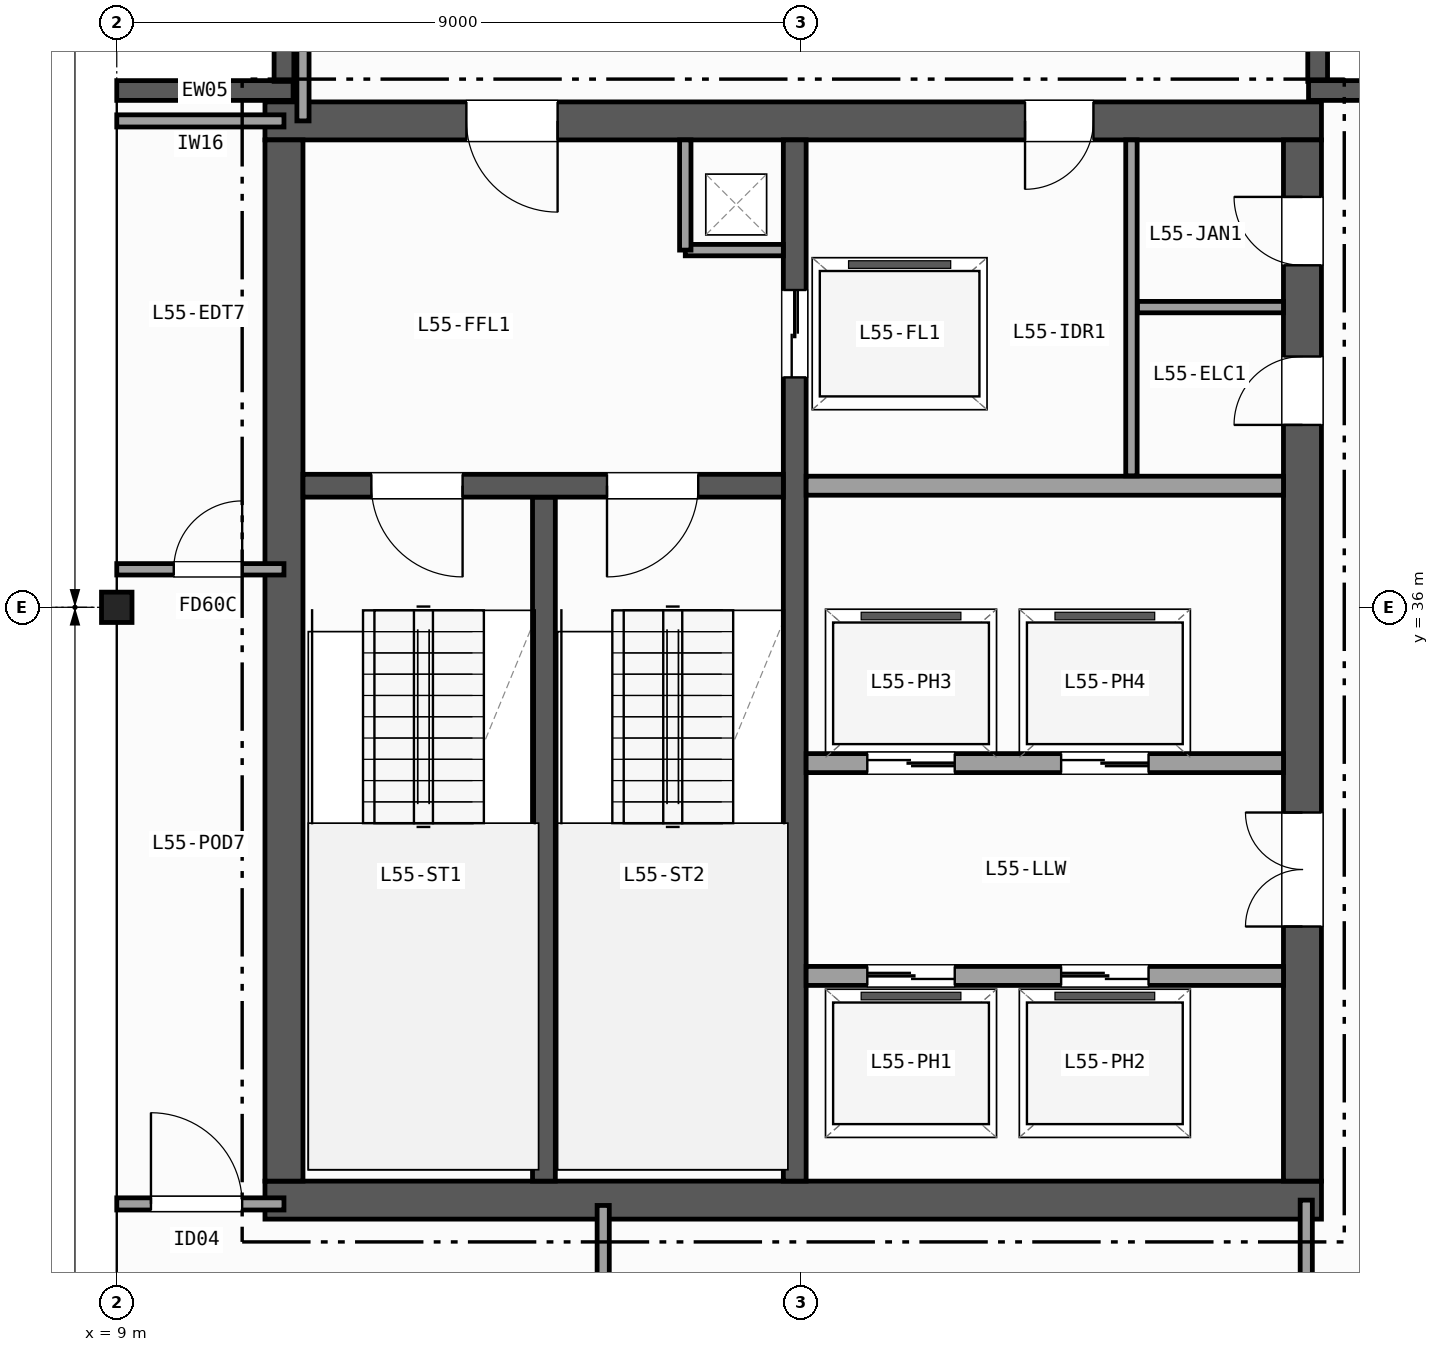
"""IFC4 building model, lengths in metres.
Left out: names, types, materials, properties, quantities, classifications, styles, units other than length and angle.
Written with IfcOpenShell. Run it as: python <this file> out.ifc"""

import sys

from ifc_helpers import new_model, si_unit, direction, frame, frame_2d, origin, origin_2d, place, context, subcontext, project, spatial, rectangle, i_section, extrude, element, fill, save


model = new_model("IFC4")
c1 = context("Model", 3, precision=1e-05, world=origin(), true_north=direction((0.0, 1.0)))
c2 = subcontext(c1, "Body", "Model", "MODEL_VIEW")
j1 = project(units=[si_unit("LENGTHUNIT", "METRE"), si_unit("PLANEANGLEUNIT", "RADIAN")], contexts=[c1])
p1 = place(None, origin())
s1 = spatial("IfcSite", under=j1, at=p1, CompositionType="ELEMENT")
p2 = place(p1, origin())
s2 = spatial("IfcBuilding", under=s1, at=p2, CompositionType="ELEMENT")
p3 = place(p2, frame((0.0, 0.0, 221.0)))
s3 = spatial("IfcBuildingStorey", under=s2, at=p3, CompositionType="ELEMENT", Elevation=221.0)
p4 = place(p3, frame((9.0, 36.0, 0.0), z_axis=(0.0, 0.0, 1.0), x_axis=(1.0, 0.0, 0.0)))
e1 = element("IfcColumn", 1, at=p4, inside=s3, PredefinedType="COLUMN", context=c2, shape_type="SweptSolid", body=[
    extrude(i_section(OverallWidth=0.401, OverallDepth=0.399, WebThickness=0.025, FlangeThickness=0.04, FilletRadius=0.015, at=origin_2d()), origin(), (0.0, 0.0, 1.0), 3.7),
])
p5 = place(p3, frame((9.0, 42.8, 0.0), z_axis=(0.0, 0.0, 1.0), x_axis=(1.0, 0.0, 0.0)))
e2 = element("IfcWall", 2, at=p5, inside=s3, PredefinedType="SOLIDWALL", context=c2, shape_type="SweptSolid", body=[
    extrude(rectangle(XDim=2.32, YDim=0.26, at=frame_2d((1.16, 0.0))), origin(), (0.0, 0.0, 1.0), 3.42),
])
for number, where, z_axis, x_axis in (
    (3, (11.2, 42.92, 0.0), (0.0, 0.0, 1.0), (0.0, 1.0, 0.0)),
    (4, (24.8, 45.0, 0.0), (0.0, 0.0, 1.0), (0.0, -1.0, 0.0)),
):
    element("IfcWall", number, at=place(p3, frame(where, z_axis=z_axis, x_axis=x_axis)), inside=s3, PredefinedType="SOLIDWALL", context=c2, shape_type="SweptSolid", body=[
        extrude(rectangle(XDim=2.08, YDim=0.26, at=frame_2d((1.04, 0.0))), origin(), (0.0, 0.0, 1.0), 3.42),
    ])
p6 = place(p3, frame((24.68, 42.8, 0.0), z_axis=(0.0, 0.0, 1.0), x_axis=(1.0, 0.0, 0.0)))
e5 = element("IfcWall", 5, at=p6, inside=s3, PredefinedType="SOLIDWALL", context=c2, shape_type="SweptSolid", body=[
    extrude(rectangle(XDim=2.32, YDim=0.26, at=frame_2d((1.16, 0.0))), origin(), (0.0, 0.0, 1.0), 3.42),
])
p7 = place(p3, frame((10.95, 28.2, 0.0), z_axis=(0.0, 0.0, 1.0), x_axis=(1.0, 0.0, 0.0)))
e6 = element("IfcWall", 6, at=p7, inside=s3, PredefinedType="SHEAR", context=c2, shape_type="SweptSolid", body=[
    extrude(rectangle(XDim=13.9, YDim=0.5, at=frame_2d((6.95, 0.0))), origin(), (0.0, 0.0, 1.0), 3.42),
])
p8 = place(p3, frame((24.85, 42.4, 0.0), z_axis=(0.0, 0.0, 1.0), x_axis=(-1.0, 0.0, 0.0)))
e7 = element("IfcWall", 7, at=p8, inside=s3, PredefinedType="SHEAR", context=c2, shape_type="SweptSolid", body=[
    extrude(rectangle(XDim=13.9, YDim=0.5, at=frame_2d((6.95, 0.0))), origin(), (0.0, 0.0, 1.0), 3.42),
])
p9 = place(p8, frame((10.05, 0.0, 0.0)))
e8 = element("IfcOpeningElement", 8, at=p9, cuts=e7, PredefinedType="OPENING", context=c2, shape_type="SweptSolid", body=[
    extrude(rectangle(XDim=1.2, YDim=2.15, at=frame_2d((0.6, 1.075))), frame((0.0, 0.26, 0.0), z_axis=(0.0, -1.0, 0.0), x_axis=(1.0, 0.0, 0.0)), (0.0, 0.0, 1.0), 0.52),
])
p10 = place(p8, frame((3.0, 0.0, 0.0)))
e9 = element("IfcOpeningElement", 9, at=p10, cuts=e7, PredefinedType="OPENING", context=c2, shape_type="SweptSolid", body=[
    extrude(rectangle(XDim=0.9, YDim=2.1, at=frame_2d((0.45, 1.05))), frame((0.0, 0.26, 0.0), z_axis=(0.0, -1.0, 0.0), x_axis=(1.0, 0.0, 0.0)), (0.0, 0.0, 1.0), 0.52),
])
p11 = place(p3, frame((11.2, 42.15, 0.0), z_axis=(0.0, 0.0, 1.0), x_axis=(0.0, -1.0, 0.0)))
e10 = element("IfcWall", 10, at=p11, inside=s3, PredefinedType="SHEAR", context=c2, shape_type="SweptSolid", body=[
    extrude(rectangle(XDim=13.7, YDim=0.5, at=frame_2d((6.85, 0.0))), origin(), (0.0, 0.0, 1.0), 3.42),
])
p12 = place(p3, frame((24.6, 28.45, 0.0), z_axis=(0.0, 0.0, 1.0), x_axis=(0.0, 1.0, 0.0)))
e11 = element("IfcWall", 11, at=p12, inside=s3, PredefinedType="SHEAR", context=c2, shape_type="SweptSolid", body=[
    extrude(rectangle(XDim=13.7, YDim=0.5, at=frame_2d((6.85, 0.0))), origin(), (0.0, 0.0, 1.0), 3.42),
])
p13 = place(p12, frame((3.35, 0.0, 0.0)))
e12 = element("IfcOpeningElement", 12, at=p13, cuts=e11, PredefinedType="OPENING", context=c2, shape_type="SweptSolid", body=[
    extrude(rectangle(XDim=1.5, YDim=2.2, at=frame_2d((0.75, 1.1))), frame((0.0, 0.26, 0.0), z_axis=(0.0, -1.0, 0.0), x_axis=(1.0, 0.0, 0.0)), (0.0, 0.0, 1.0), 0.52),
])
p14 = place(p12, frame((9.95, 0.0, 0.0)))
e13 = element("IfcOpeningElement", 13, at=p14, cuts=e11, PredefinedType="OPENING", context=c2, shape_type="SweptSolid", body=[
    extrude(rectangle(XDim=0.9, YDim=2.1, at=frame_2d((0.45, 1.05))), frame((0.0, 0.26, 0.0), z_axis=(0.0, -1.0, 0.0), x_axis=(1.0, 0.0, 0.0)), (0.0, 0.0, 1.0), 0.52),
])
p15 = place(p12, frame((12.05, 0.0, 0.0)))
e14 = element("IfcOpeningElement", 14, at=p15, cuts=e11, PredefinedType="OPENING", context=c2, shape_type="SweptSolid", body=[
    extrude(rectangle(XDim=0.9, YDim=2.1, at=frame_2d((0.45, 1.05))), frame((0.0, 0.26, 0.0), z_axis=(0.0, -1.0, 0.0), x_axis=(1.0, 0.0, 0.0)), (0.0, 0.0, 1.0), 0.52),
])
p16 = place(p3, frame((14.62, 28.45, 0.0), z_axis=(0.0, 0.0, 1.0), x_axis=(0.0, 1.0, 0.0)))
e15 = element("IfcWall", 15, at=p16, inside=s3, PredefinedType="SHEAR", context=c2, shape_type="SweptSolid", body=[
    extrude(rectangle(XDim=9.0, YDim=0.3, at=frame_2d((4.5, 0.0))), origin(), (0.0, 0.0, 1.0), 3.42),
])
p17 = place(p3, frame((17.92, 42.15, 0.0), z_axis=(0.0, 0.0, 1.0), x_axis=(0.0, -1.0, 0.0)))
e16 = element("IfcWall", 16, at=p17, inside=s3, PredefinedType="SHEAR", context=c2, shape_type="SweptSolid", body=[
    extrude(rectangle(XDim=13.7, YDim=0.3, at=frame_2d((6.85, 0.0))), origin(), (0.0, 0.0, 1.0), 3.42),
])
p18 = place(p17, frame((1.975, 0.0, 0.0)))
e17 = element("IfcOpeningElement", 17, at=p18, cuts=e16, PredefinedType="OPENING", context=c2, shape_type="SweptSolid", body=[
    extrude(rectangle(XDim=1.15, YDim=2.15, at=frame_2d((0.575, 1.075))), frame((0.0, 0.16, 0.0), z_axis=(0.0, -1.0, 0.0), x_axis=(1.0, 0.0, 0.0)), (0.0, 0.0, 1.0), 0.32),
])
p19 = place(p3, frame((17.77, 37.6, 0.0), z_axis=(0.0, 0.0, 1.0), x_axis=(-1.0, 0.0, 0.0)))
e18 = element("IfcWall", 18, at=p19, inside=s3, PredefinedType="SHEAR", context=c2, shape_type="SweptSolid", body=[
    extrude(rectangle(XDim=6.32, YDim=0.3, at=frame_2d((3.16, 0.0))), origin(), (0.0, 0.0, 1.0), 3.42),
])
p20 = place(p19, frame((4.22, 0.0, 0.0)))
e19 = element("IfcOpeningElement", 19, at=p20, cuts=e18, PredefinedType="OPENING", context=c2, shape_type="SweptSolid", body=[
    extrude(rectangle(XDim=1.2, YDim=2.15, at=frame_2d((0.6, 1.075))), frame((0.0, 0.16, 0.0), z_axis=(0.0, -1.0, 0.0), x_axis=(1.0, 0.0, 0.0)), (0.0, 0.0, 1.0), 0.32),
])
p21 = place(p19, frame((1.12, 0.0, 0.0)))
e20 = element("IfcOpeningElement", 20, at=p21, cuts=e18, PredefinedType="OPENING", context=c2, shape_type="SweptSolid", body=[
    extrude(rectangle(XDim=1.2, YDim=2.15, at=frame_2d((0.6, 1.075))), frame((0.0, 0.16, 0.0), z_axis=(0.0, -1.0, 0.0), x_axis=(1.0, 0.0, 0.0)), (0.0, 0.0, 1.0), 0.32),
])
p22 = place(p3, frame((16.48, 40.7, 0.0), z_axis=(0.0, 0.0, 1.0), x_axis=(1.0, 0.0, 0.0)))
e21 = element("IfcWall", 21, at=p22, inside=s3, PredefinedType="PARTITIONING", context=c2, shape_type="SweptSolid", body=[
    extrude(rectangle(XDim=1.29, YDim=0.15, at=frame_2d((0.645, 0.0))), origin(), (0.0, 0.0, 1.0), 3.42),
])
p23 = place(p3, frame((16.48, 40.7, 0.0), z_axis=(0.0, 0.0, 1.0), x_axis=(0.0, 1.0, 0.0)))
e22 = element("IfcWall", 22, at=p23, inside=s3, PredefinedType="PARTITIONING", context=c2, shape_type="SweptSolid", body=[
    extrude(rectangle(XDim=1.45, YDim=0.15, at=frame_2d((0.725, 0.0))), origin(), (0.0, 0.0, 1.0), 3.42),
])
p24 = place(p3, frame((18.07, 37.6, 0.0), z_axis=(0.0, 0.0, 1.0), x_axis=(1.0, 0.0, 0.0)))
e23 = element("IfcWall", 23, at=p24, inside=s3, PredefinedType="PARTITIONING", context=c2, shape_type="SweptSolid", body=[
    extrude(rectangle(XDim=6.28, YDim=0.25, at=frame_2d((3.14, 0.0))), origin(), (0.0, 0.0, 1.0), 3.42),
])
p25 = place(p3, frame((18.07, 31.15, 0.0), z_axis=(0.0, 0.0, 1.0), x_axis=(1.0, 0.0, 0.0)))
e24 = element("IfcWall", 24, at=p25, inside=s3, PredefinedType="PARTITIONING", context=c2, shape_type="SweptSolid", body=[
    extrude(rectangle(XDim=6.28, YDim=0.25, at=frame_2d((3.14, 0.0))), origin(), (0.0, 0.0, 1.0), 3.42),
])
p26 = place(p25, frame((0.805, 0.0, 0.0)))
e25 = element("IfcOpeningElement", 25, at=p26, cuts=e24, PredefinedType="OPENING", context=c2, shape_type="SweptSolid", body=[
    extrude(rectangle(XDim=1.15, YDim=2.15, at=frame_2d((0.575, 1.075))), frame((0.0, 0.135, 0.0), z_axis=(0.0, -1.0, 0.0), x_axis=(1.0, 0.0, 0.0)), (0.0, 0.0, 1.0), 0.27),
])
p27 = place(p25, frame((3.355, 0.0, 0.0)))
e26 = element("IfcOpeningElement", 26, at=p27, cuts=e24, PredefinedType="OPENING", context=c2, shape_type="SweptSolid", body=[
    extrude(rectangle(XDim=1.15, YDim=2.15, at=frame_2d((0.575, 1.075))), frame((0.0, 0.135, 0.0), z_axis=(0.0, -1.0, 0.0), x_axis=(1.0, 0.0, 0.0)), (0.0, 0.0, 1.0), 0.27),
])
p28 = place(p3, frame((24.35, 33.95, 0.0), z_axis=(0.0, 0.0, 1.0), x_axis=(-1.0, 0.0, 0.0)))
e27 = element("IfcWall", 27, at=p28, inside=s3, PredefinedType="PARTITIONING", context=c2, shape_type="SweptSolid", body=[
    extrude(rectangle(XDim=6.28, YDim=0.25, at=frame_2d((3.14, 0.0))), origin(), (0.0, 0.0, 1.0), 3.42),
])
p29 = place(p28, frame((4.325, 0.0, 0.0)))
e28 = element("IfcOpeningElement", 28, at=p29, cuts=e27, PredefinedType="OPENING", context=c2, shape_type="SweptSolid", body=[
    extrude(rectangle(XDim=1.15, YDim=2.15, at=frame_2d((0.575, 1.075))), frame((0.0, 0.135, 0.0), z_axis=(0.0, -1.0, 0.0), x_axis=(1.0, 0.0, 0.0)), (0.0, 0.0, 1.0), 0.27),
])
p30 = place(p28, frame((1.775, 0.0, 0.0)))
e29 = element("IfcOpeningElement", 29, at=p30, cuts=e27, PredefinedType="OPENING", context=c2, shape_type="SweptSolid", body=[
    extrude(rectangle(XDim=1.15, YDim=2.15, at=frame_2d((0.575, 1.075))), frame((0.0, 0.135, 0.0), z_axis=(0.0, -1.0, 0.0), x_axis=(1.0, 0.0, 0.0)), (0.0, 0.0, 1.0), 0.27),
])
p31 = place(p3, frame((22.35, 37.73, 0.0), z_axis=(0.0, 0.0, 1.0), x_axis=(0.0, 1.0, 0.0)))
e30 = element("IfcWall", 30, at=p31, inside=s3, PredefinedType="PARTITIONING", context=c2, shape_type="SweptSolid", body=[
    extrude(rectangle(XDim=4.42, YDim=0.15, at=frame_2d((2.21, 0.0))), origin(), (0.0, 0.0, 1.0), 3.42),
])
p32 = place(p3, frame((22.43, 39.95, 0.0), z_axis=(0.0, 0.0, 1.0), x_axis=(1.0, 0.0, 0.0)))
e31 = element("IfcWall", 31, at=p32, inside=s3, PredefinedType="PARTITIONING", context=c2, shape_type="SweptSolid", body=[
    extrude(rectangle(XDim=1.92, YDim=0.15, at=frame_2d((0.96, 0.0))), origin(), (0.0, 0.0, 1.0), 3.42),
])
p33 = place(p3, frame((9.0, 28.15, 0.0), z_axis=(0.0, 0.0, 1.0), x_axis=(1.0, 0.0, 0.0)))
e32 = element("IfcWall", 32, at=p33, inside=s3, PredefinedType="PARTITIONING", context=c2, shape_type="SweptSolid", body=[
    extrude(rectangle(XDim=2.2, YDim=0.16, at=frame_2d((1.1, 0.0))), origin(), (0.0, 0.0, 1.0), 2.707),
])
p34 = place(p33, frame((0.45, 0.0, 0.0)))
e33 = element("IfcOpeningElement", 33, at=p34, cuts=e32, PredefinedType="OPENING", context=c2, shape_type="SweptSolid", body=[
    extrude(rectangle(XDim=1.2, YDim=2.15, at=frame_2d((0.6, 1.075))), frame((0.0, 0.09, 0.0), z_axis=(0.0, -1.0, 0.0), x_axis=(1.0, 0.0, 0.0)), (0.0, 0.0, 1.0), 0.18),
])
p35 = place(p3, frame((9.0, 42.4, 0.0), z_axis=(0.0, 0.0, 1.0), x_axis=(1.0, 0.0, 0.0)))
e34 = element("IfcWall", 34, at=p35, inside=s3, PredefinedType="PARTITIONING", context=c2, shape_type="SweptSolid", body=[
    extrude(rectangle(XDim=2.2, YDim=0.16, at=frame_2d((1.1, 0.0))), origin(), (0.0, 0.0, 1.0), 3.42),
])
p36 = place(p3, frame((11.45, 42.4, 0.0), z_axis=(0.0, 0.0, 1.0), x_axis=(0.0, 1.0, 0.0)))
e35 = element("IfcWall", 35, at=p36, inside=s3, PredefinedType="PARTITIONING", context=c2, shape_type="SweptSolid", body=[
    extrude(rectangle(XDim=2.666, YDim=0.16, at=frame_2d((1.333, 0.0))), origin(), (0.0, 0.0, 1.0), 3.42),
])
p37 = place(p3, frame((9.0, 36.5, 0.0), z_axis=(0.0, 0.0, 1.0), x_axis=(1.0, 0.0, 0.0)))
e36 = element("IfcWall", 36, at=p37, inside=s3, PredefinedType="PARTITIONING", context=c2, shape_type="SweptSolid", body=[
    extrude(rectangle(XDim=2.2, YDim=0.15, at=frame_2d((1.1, 0.0))), origin(), (0.0, 0.0, 1.0), 3.42),
])
p38 = place(p37, frame((0.75, 0.0, 0.0)))
e37 = element("IfcOpeningElement", 37, at=p38, cuts=e36, PredefinedType="OPENING", context=c2, shape_type="SweptSolid", body=[
    extrude(rectangle(XDim=0.9, YDim=2.1, at=frame_2d((0.45, 1.05))), frame((0.0, 0.085, 0.0), z_axis=(0.0, -1.0, 0.0), x_axis=(1.0, 0.0, 0.0)), (0.0, 0.0, 1.0), 0.17),
])
p39 = place(p3, frame((24.65, 9.0, 0.0), z_axis=(0.0, 0.0, 1.0), x_axis=(0.0, 1.0, 0.0)))
e38 = element("IfcWall", 38, at=p39, inside=s3, PredefinedType="PARTITIONING", context=c2, shape_type="SweptSolid", body=[
    extrude(rectangle(XDim=19.2, YDim=0.16, at=frame_2d((9.6, 0.0))), origin(), (0.0, 0.0, 1.0), 2.707),
])
p40 = place(p39, frame((12.2, 0.0, 0.0)))
e39 = element("IfcOpeningElement", 39, at=p40, cuts=e38, PredefinedType="OPENING", context=c2, shape_type="SweptSolid", body=[
    extrude(rectangle(XDim=0.95, YDim=2.1, at=frame_2d((0.475, 1.05))), frame((0.0, 0.09, 0.0), z_axis=(0.0, -1.0, 0.0), x_axis=(1.0, 0.0, 0.0)), (0.0, 0.0, 1.0), 0.18),
])
p41 = place(p39, frame((4.2, 0.0, 0.0)))
e40 = element("IfcOpeningElement", 40, at=p41, cuts=e38, PredefinedType="OPENING", context=c2, shape_type="SweptSolid", body=[
    extrude(rectangle(XDim=1.0, YDim=2.1, at=frame_2d((0.5, 1.05))), frame((0.0, 0.09, 0.0), z_axis=(0.0, -1.0, 0.0), x_axis=(1.0, 0.0, 0.0)), (0.0, 0.0, 1.0), 0.18),
])
p42 = place(p3, frame((15.4, 18.0, 0.0), z_axis=(0.0, 0.0, 1.0), x_axis=(0.0, 1.0, 0.0)))
e41 = element("IfcWall", 41, at=p42, inside=s3, PredefinedType="PARTITIONING", context=c2, shape_type="SweptSolid", body=[
    extrude(rectangle(XDim=10.13, YDim=0.16, at=frame_2d((5.065, 0.0))), origin(), (0.0, 0.0, 1.0), 2.789),
])
p43 = place(p42, frame((2.5, 0.0, 0.0)))
e42 = element("IfcOpeningElement", 42, at=p43, cuts=e41, PredefinedType="OPENING", context=c2, shape_type="SweptSolid", body=[
    extrude(rectangle(XDim=1.05, YDim=2.15, at=frame_2d((0.525, 1.075))), frame((0.0, 0.09, 0.0), z_axis=(0.0, -1.0, 0.0), x_axis=(1.0, 0.0, 0.0)), (0.0, 0.0, 1.0), 0.18),
])
p44 = place(p20, origin())
e43 = element("IfcDoor", 43, at=p44, inside=s3, OperationType="SINGLE_SWING_LEFT", PredefinedType="DOOR", context=c2, shape_type="SweptSolid", body=[
    extrude(rectangle(XDim=1.2, YDim=2.15, at=frame_2d((0.6, 1.075))), frame((0.0, 0.025, 0.0), z_axis=(0.0, -1.0, 0.0), x_axis=(1.0, 0.0, 0.0)), (0.0, 0.0, 1.0), 0.05),
])
fill(e19, e43)
p45 = place(p21, origin())
e44 = element("IfcDoor", 44, at=p45, inside=s3, OperationType="SINGLE_SWING_RIGHT", PredefinedType="DOOR", context=c2, shape_type="SweptSolid", body=[
    extrude(rectangle(XDim=1.2, YDim=2.15, at=frame_2d((0.6, 1.075))), frame((0.0, 0.025, 0.0), z_axis=(0.0, -1.0, 0.0), x_axis=(1.0, 0.0, 0.0)), (0.0, 0.0, 1.0), 0.05),
])
fill(e20, e44)
p46 = place(p13, origin())
e45 = element("IfcDoor", 45, at=p46, inside=s3, OperationType="DOUBLE_DOOR_SINGLE_SWING", PredefinedType="DOOR", context=c2, shape_type="SweptSolid", body=[
    extrude(rectangle(XDim=1.5, YDim=2.2, at=frame_2d((0.75, 1.1))), frame((0.0, 0.025, 0.0), z_axis=(0.0, -1.0, 0.0), x_axis=(1.0, 0.0, 0.0)), (0.0, 0.0, 1.0), 0.05),
])
fill(e12, e45)
p47 = place(p9, origin())
e46 = element("IfcDoor", 46, at=p47, inside=s3, OperationType="SINGLE_SWING_LEFT", PredefinedType="DOOR", context=c2, shape_type="SweptSolid", body=[
    extrude(rectangle(XDim=1.2, YDim=2.15, at=frame_2d((0.6, 1.075))), frame((0.0, 0.025, 0.0), z_axis=(0.0, -1.0, 0.0), x_axis=(1.0, 0.0, 0.0)), (0.0, 0.0, 1.0), 0.05),
])
fill(e8, e46)
p48 = place(p14, origin())
e47 = element("IfcDoor", 47, at=p48, inside=s3, OperationType="SINGLE_SWING_LEFT", PredefinedType="DOOR", context=c2, shape_type="SweptSolid", body=[
    extrude(rectangle(XDim=0.9, YDim=2.1, at=frame_2d((0.45, 1.05))), frame((0.0, 0.025, 0.0), z_axis=(0.0, -1.0, 0.0), x_axis=(1.0, 0.0, 0.0)), (0.0, 0.0, 1.0), 0.05),
])
fill(e13, e47)
p49 = place(p10, origin())
e48 = element("IfcDoor", 48, at=p49, inside=s3, OperationType="SINGLE_SWING_RIGHT", PredefinedType="DOOR", context=c2, shape_type="SweptSolid", body=[
    extrude(rectangle(XDim=0.9, YDim=2.1, at=frame_2d((0.45, 1.05))), frame((0.0, 0.025, 0.0), z_axis=(0.0, -1.0, 0.0), x_axis=(1.0, 0.0, 0.0)), (0.0, 0.0, 1.0), 0.05),
])
fill(e9, e48)
p50 = place(p15, origin())
e49 = element("IfcDoor", 49, at=p50, inside=s3, OperationType="SINGLE_SWING_RIGHT", PredefinedType="DOOR", context=c2, shape_type="SweptSolid", body=[
    extrude(rectangle(XDim=0.9, YDim=2.1, at=frame_2d((0.45, 1.05))), frame((0.0, 0.025, 0.0), z_axis=(0.0, -1.0, 0.0), x_axis=(1.0, 0.0, 0.0)), (0.0, 0.0, 1.0), 0.05),
])
fill(e14, e49)
p51 = place(p18, origin())
e50 = element("IfcDoor", 50, at=p51, inside=s3, OperationType="DOUBLE_DOOR_SLIDING", PredefinedType="DOOR", context=c2, shape_type="SweptSolid", body=[
    extrude(rectangle(XDim=1.15, YDim=2.15, at=frame_2d((0.575, 1.075))), frame((0.0, 0.025, 0.0), z_axis=(0.0, -1.0, 0.0), x_axis=(1.0, 0.0, 0.0)), (0.0, 0.0, 1.0), 0.05),
])
fill(e17, e50)
p52 = place(p26, origin())
e51 = element("IfcDoor", 51, at=p52, inside=s3, OperationType="DOUBLE_DOOR_SLIDING", PredefinedType="DOOR", context=c2, shape_type="SweptSolid", body=[
    extrude(rectangle(XDim=1.15, YDim=2.15, at=frame_2d((0.575, 1.075))), frame((0.0, 0.025, 0.0), z_axis=(0.0, -1.0, 0.0), x_axis=(1.0, 0.0, 0.0)), (0.0, 0.0, 1.0), 0.05),
])
fill(e25, e51)
p53 = place(p27, origin())
e52 = element("IfcDoor", 52, at=p53, inside=s3, OperationType="DOUBLE_DOOR_SLIDING", PredefinedType="DOOR", context=c2, shape_type="SweptSolid", body=[
    extrude(rectangle(XDim=1.15, YDim=2.15, at=frame_2d((0.575, 1.075))), frame((0.0, 0.025, 0.0), z_axis=(0.0, -1.0, 0.0), x_axis=(1.0, 0.0, 0.0)), (0.0, 0.0, 1.0), 0.05),
])
fill(e26, e52)
p54 = place(p29, origin())
e53 = element("IfcDoor", 53, at=p54, inside=s3, OperationType="DOUBLE_DOOR_SLIDING", PredefinedType="DOOR", context=c2, shape_type="SweptSolid", body=[
    extrude(rectangle(XDim=1.15, YDim=2.15, at=frame_2d((0.575, 1.075))), frame((0.0, 0.025, 0.0), z_axis=(0.0, -1.0, 0.0), x_axis=(1.0, 0.0, 0.0)), (0.0, 0.0, 1.0), 0.05),
])
fill(e28, e53)
p55 = place(p30, origin())
e54 = element("IfcDoor", 54, at=p55, inside=s3, OperationType="DOUBLE_DOOR_SLIDING", PredefinedType="DOOR", context=c2, shape_type="SweptSolid", body=[
    extrude(rectangle(XDim=1.15, YDim=2.15, at=frame_2d((0.575, 1.075))), frame((0.0, 0.025, 0.0), z_axis=(0.0, -1.0, 0.0), x_axis=(1.0, 0.0, 0.0)), (0.0, 0.0, 1.0), 0.05),
])
fill(e29, e54)
p56 = place(p34, origin())
e55 = element("IfcDoor", 55, at=p56, inside=s3, OperationType="SINGLE_SWING_LEFT", PredefinedType="DOOR", context=c2, shape_type="SweptSolid", body=[
    extrude(rectangle(XDim=1.2, YDim=2.15, at=frame_2d((0.6, 1.075))), frame((0.0, 0.025, 0.0), z_axis=(0.0, -1.0, 0.0), x_axis=(1.0, 0.0, 0.0)), (0.0, 0.0, 1.0), 0.05),
])
fill(e33, e55)
p57 = place(p38, origin())
e56 = element("IfcDoor", 56, at=p57, inside=s3, OperationType="SINGLE_SWING_RIGHT", PredefinedType="DOOR", context=c2, shape_type="SweptSolid", body=[
    extrude(rectangle(XDim=0.9, YDim=2.1, at=frame_2d((0.45, 1.05))), frame((0.0, 0.025, 0.0), z_axis=(0.0, -1.0, 0.0), x_axis=(1.0, 0.0, 0.0)), (0.0, 0.0, 1.0), 0.05),
])
fill(e37, e56)
save(model, sys.argv[1])
